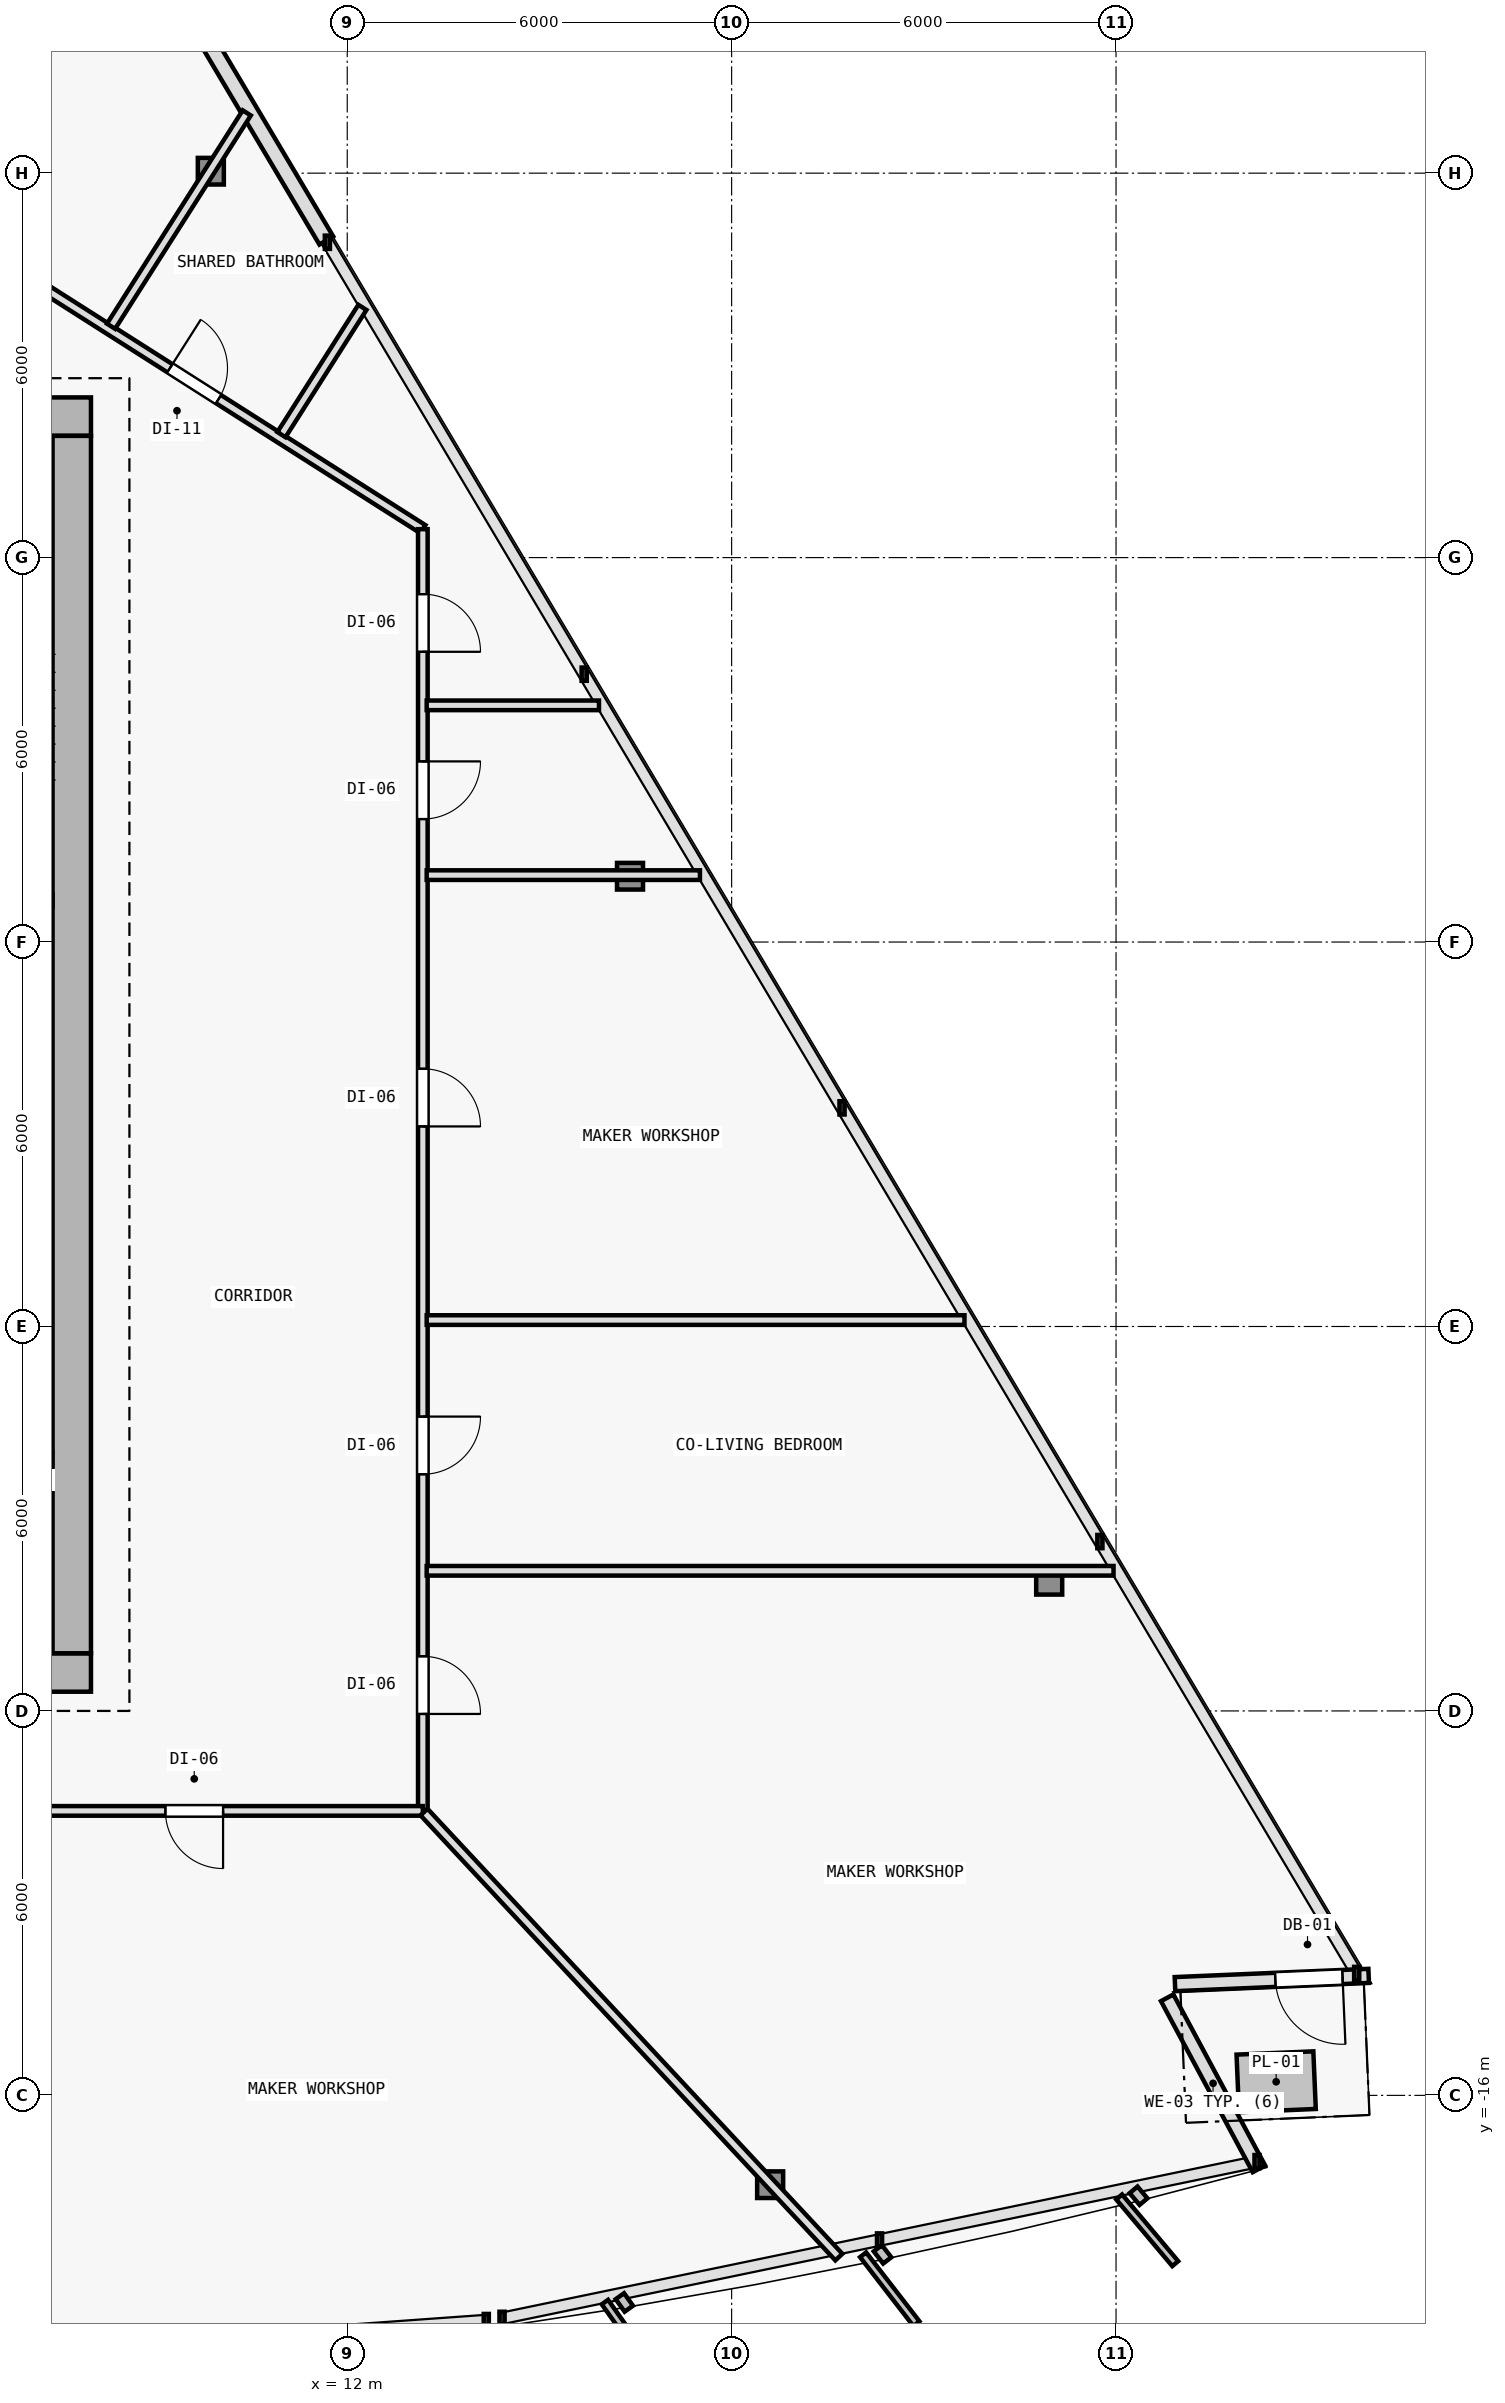
"""IFC4 building model, lengths in metres.
Left out: names, types, materials, properties, quantities, classifications, styles, units other than length and angle.
Written with IfcOpenShell. Run it as: python <this file> out.ifc"""

import sys

from ifc_helpers import new_model, si_unit, direction, frame, frame_2d, origin, origin_2d, place, context, subcontext, project, spatial, rectangle, i_section, extrude, element, fill, save


model = new_model("IFC4")
c1 = context("Model", 3, precision=1e-05, world=origin(), true_north=direction((0.0, 1.0)))
c2 = subcontext(c1, "Body", "Model", "MODEL_VIEW")
j1 = project(units=[si_unit("LENGTHUNIT", "METRE"), si_unit("PLANEANGLEUNIT", "RADIAN")], contexts=[c1])
p1 = place(None, origin())
s1 = spatial("IfcSite", under=j1, at=p1, CompositionType="ELEMENT")
p2 = place(p1, origin())
s2 = spatial("IfcBuilding", under=s1, at=p2, CompositionType="ELEMENT")
p3 = place(p2, frame((0.0, 0.0, 114.9)))
s3 = spatial("IfcBuildingStorey", under=s2, at=p3, CompositionType="ELEMENT", Elevation=114.9)
for number, where, z_axis, x_axis in (
    (1, (7.7, -9.4, 0.0), (0.0, 0.0, 1.0), (1.0, 0.0, 0.0)),
    (2, (7.7, 10.2, 0.0), (0.0, 0.0, 1.0), (1.0, 0.0, 0.0)),
    (3, (7.7, 0.4, 0.0), (0.0, 0.0, 1.0), (1.0, 0.0, 0.0)),
):
    element("IfcColumn", number, at=place(p3, frame(where, z_axis=z_axis, x_axis=x_axis)), inside=s3, PredefinedType="COLUMN", context=c2, shape_type="SweptSolid", body=[
        extrude(i_section(OverallWidth=0.409, OverallDepth=0.425, WebThickness=0.021, FlangeThickness=0.034, FilletRadius=0.015, at=origin_2d()), origin(), (0.0, 0.0, 1.0), 3.6),
    ])
p4 = place(p3, frame((18.601, -17.394, 0.006), z_axis=(-0.020596339702, 0.033443561496, 0.99922836178), x_axis=(-0.851480003019, -0.52438707503, 0.0)))
e4 = element("IfcColumn", 4, at=p4, inside=s3, PredefinedType="COLUMN", context=c2, shape_type="SweptSolid", body=[
    extrude(i_section(OverallWidth=0.406, OverallDepth=0.416, WebThickness=0.019, FlangeThickness=0.031, FilletRadius=0.015, at=origin_2d()), origin(), (0.0, 0.0, 1.0), 3.592),
])
p5 = place(p3, frame((22.957, -7.976, 0.006), z_axis=(-0.026107436898, 0.021620221181, 0.999425318758), x_axis=(-0.637813971185, -0.770190455771, 0.0)))
e5 = element("IfcColumn", 5, at=p5, inside=s3, PredefinedType="COLUMN", context=c2, shape_type="SweptSolid", body=[
    extrude(i_section(OverallWidth=0.406, OverallDepth=0.416, WebThickness=0.019, FlangeThickness=0.031, FilletRadius=0.015, at=origin_2d()), origin(), (0.0, 0.0, 1.0), 3.591),
])
p6 = place(p3, frame((16.414, 3.027, 0.006), z_axis=(-0.018907326549, 0.00952167524, 0.999775900241), x_axis=(-0.449781931574, -0.893138406984, 0.0)))
e6 = element("IfcColumn", 6, at=p6, inside=s3, PredefinedType="COLUMN", context=c2, shape_type="SweptSolid", body=[
    extrude(i_section(OverallWidth=0.406, OverallDepth=0.416, WebThickness=0.019, FlangeThickness=0.031, FilletRadius=0.015, at=origin_2d()), origin(), (0.0, 0.0, 1.0), 3.59),
])
p7 = place(p3, frame((9.871, 14.031, 0.006), z_axis=(-0.011699842352, -0.002516826552, 0.999928387072), x_axis=(0.210305364179, -0.977635746993, 0.0)))
e7 = element("IfcColumn", 7, at=p7, inside=s3, PredefinedType="COLUMN", context=c2, shape_type="SweptSolid", body=[
    extrude(i_section(OverallWidth=0.406, OverallDepth=0.416, WebThickness=0.019, FlangeThickness=0.031, FilletRadius=0.015, at=origin_2d()), origin(), (0.0, 0.0, 1.0), 3.589),
])
p8 = place(p3, frame((6.017, 22.462, 0.0), z_axis=(0.0, 0.0, 1.0), x_axis=(0.511085523564, -0.859529864288, 0.0)))
e8 = element("IfcWall", 8, at=p8, inside=s3, PredefinedType="SOLIDWALL", context=c2, shape_type="SweptSolid", body=[
    extrude(rectangle(XDim=11.068, YDim=0.25, at=frame_2d((5.534, 0.0))), origin(), (0.0, 0.0, 1.0), 3.35),
])
p9 = place(p8, frame((5.084, 0.0, 0.62)))
e9 = element("IfcOpeningElement", 9, at=p9, cuts=e8, PredefinedType="OPENING", context=c2, shape_type="SweptSolid", body=[
    extrude(rectangle(XDim=0.9, YDim=1.6, at=frame_2d((0.45, 0.8))), frame((0.0, 0.135, 0.0), z_axis=(0.0, -1.0, 0.0), x_axis=(1.0, 0.0, 0.0)), (0.0, 0.0, 1.0), 0.27),
])
p10 = place(p3, frame((24.798, -14.477, 0.0), z_axis=(0.0, 0.0, 1.0), x_axis=(0.472820757697, -0.881158629925, 0.0)))
e10 = element("IfcWall", 10, at=p10, inside=s3, PredefinedType="SOLIDWALL", context=c2, shape_type="SweptSolid", body=[
    extrude(rectangle(XDim=3.029, YDim=0.22, at=frame_2d((1.514, 0.0))), origin(), (0.0, 0.0, 1.0), 3.35),
])
p11 = place(p3, frame((27.943, -14.135, 0.0), z_axis=(0.0, 0.0, 1.0), x_axis=(-0.999095621918, -0.042519857284, 0.0)))
e11 = element("IfcWall", 11, at=p11, inside=s3, PredefinedType="SOLIDWALL", context=c2, shape_type="SweptSolid", body=[
    extrude(rectangle(XDim=3.026, YDim=0.22, at=frame_2d((1.513, 0.0))), origin(), (0.0, 0.0, 1.0), 3.35),
])
p12 = place(p11, frame((0.408, 0.0, 0.0)))
e12 = element("IfcOpeningElement", 12, at=p12, cuts=e11, PredefinedType="OPENING", context=c2, shape_type="SweptSolid", body=[
    extrude(rectangle(XDim=1.05, YDim=2.15, at=frame_2d((0.525, 1.075))), frame((0.0, 0.12, 0.0), z_axis=(0.0, -1.0, 0.0), x_axis=(1.0, 0.0, 0.0)), (0.0, 0.0, 1.0), 0.24),
])
p13 = place(p3, frame((-8.0, -9.4, 0.0), z_axis=(0.0, 0.0, 1.0), x_axis=(1.0, 0.0, 0.0)))
e13 = element("IfcWall", 13, at=p13, inside=s3, PredefinedType="SHEAR", context=c2, shape_type="SweptSolid", body=[
    extrude(rectangle(XDim=16.0, YDim=0.6, at=frame_2d((8.0, 0.0))), origin(), (0.0, 0.0, 1.0), 3.35),
])
p14 = place(p13, frame((9.65, 0.0, 0.0)))
e14 = element("IfcOpeningElement", 14, at=p14, cuts=e13, PredefinedType="OPENING", context=c2, shape_type="SweptSolid", body=[
    extrude(rectangle(XDim=1.5, YDim=2.2, at=frame_2d((0.75, 1.1))), frame((0.0, 0.31, 0.0), z_axis=(0.0, -1.0, 0.0), x_axis=(1.0, 0.0, 0.0)), (0.0, 0.0, 1.0), 0.62),
])
p15 = place(p3, frame((8.0, 10.2, 0.0), z_axis=(0.0, 0.0, 1.0), x_axis=(-1.0, 0.0, 0.0)))
e15 = element("IfcWall", 15, at=p15, inside=s3, PredefinedType="SHEAR", context=c2, shape_type="SweptSolid", body=[
    extrude(rectangle(XDim=16.0, YDim=0.6, at=frame_2d((8.0, 0.0))), origin(), (0.0, 0.0, 1.0), 3.35),
])
p16 = place(p15, frame((4.45, 0.0, 0.0)))
e16 = element("IfcOpeningElement", 16, at=p16, cuts=e15, PredefinedType="OPENING", context=c2, shape_type="SweptSolid", body=[
    extrude(rectangle(XDim=1.1, YDim=2.15, at=frame_2d((0.55, 1.075))), frame((0.0, 0.31, 0.0), z_axis=(0.0, -1.0, 0.0), x_axis=(1.0, 0.0, 0.0)), (0.0, 0.0, 1.0), 0.62),
])
p17 = place(p3, frame((7.7, 9.9, 0.0), z_axis=(0.0, 0.0, 1.0), x_axis=(0.0, -1.0, 0.0)))
e17 = element("IfcWall", 17, at=p17, inside=s3, PredefinedType="SHEAR", context=c2, shape_type="SweptSolid", body=[
    extrude(rectangle(XDim=19.0, YDim=0.6, at=frame_2d((9.5, 0.0))), origin(), (0.0, 0.0, 1.0), 3.35),
])
p18 = place(p3, frame((4.05, 2.65, 0.0), z_axis=(0.0, 0.0, 1.0), x_axis=(1.0, 0.0, 0.0)))
e18 = element("IfcWall", 18, at=p18, inside=s3, PredefinedType="SOLIDWALL", context=c2, shape_type="SweptSolid", body=[
    extrude(rectangle(XDim=3.35, YDim=0.2, at=frame_2d((1.675, 0.0))), origin(), (0.0, 0.0, 1.0), 3.35),
])
p19 = place(p3, frame((4.15, -6.05, 0.0), z_axis=(0.0, 0.0, 1.0), x_axis=(1.0, 0.0, 0.0)))
e19 = element("IfcWall", 19, at=p19, inside=s3, PredefinedType="SOLIDWALL", context=c2, shape_type="SweptSolid", body=[
    extrude(rectangle(XDim=3.245, YDim=0.2, at=frame_2d((1.623, 0.0))), origin(), (0.0, 0.0, 1.0), 3.35),
])
p20 = place(p3, frame((7.023, 12.36, 0.0), z_axis=(0.0, 0.0, 1.0), x_axis=(0.84376480085, -0.536713108511, 0.0)))
e20 = element("IfcWall", 20, at=p20, inside=s3, PredefinedType="PARTITIONING", context=c2, shape_type="SweptSolid", body=[
    extrude(rectangle(XDim=7.297, YDim=0.15, at=frame_2d((3.648, 0.0))), origin(), (0.0, 0.0, 1.0), 2.775),
])
p21 = place(p20, frame((2.617, 0.0, 0.0)))
e21 = element("IfcOpeningElement", 21, at=p21, cuts=e20, PredefinedType="OPENING", context=c2, shape_type="SweptSolid", body=[
    extrude(rectangle(XDim=0.9, YDim=2.1, at=frame_2d((0.45, 1.05))), frame((0.0, 0.085, 0.0), z_axis=(0.0, -1.0, 0.0), x_axis=(1.0, 0.0, 0.0)), (0.0, 0.0, 1.0), 0.17),
])
p22 = place(p3, frame((13.18, 8.444, 0.0), z_axis=(0.0, 0.0, 1.0), x_axis=(0.0, -1.0, 0.0)))
e22 = element("IfcWall", 22, at=p22, inside=s3, PredefinedType="PARTITIONING", context=c2, shape_type="SweptSolid", body=[
    extrude(rectangle(XDim=20.004, YDim=0.15, at=frame_2d((10.002, 0.0))), origin(), (0.0, 0.0, 1.0), 2.705),
])
p23 = place(p22, frame((17.591, 0.0, 0.0)))
e23 = element("IfcOpeningElement", 23, at=p23, cuts=e22, PredefinedType="OPENING", context=c2, shape_type="SweptSolid", body=[
    extrude(rectangle(XDim=0.9, YDim=2.1, at=frame_2d((0.45, 1.05))), frame((0.0, 0.085, 0.0), z_axis=(0.0, -1.0, 0.0), x_axis=(1.0, 0.0, 0.0)), (0.0, 0.0, 1.0), 0.17),
])
p24 = place(p22, frame((13.85, 0.0, 0.0)))
e24 = element("IfcOpeningElement", 24, at=p24, cuts=e22, PredefinedType="OPENING", context=c2, shape_type="SweptSolid", body=[
    extrude(rectangle(XDim=0.9, YDim=2.1, at=frame_2d((0.45, 1.05))), frame((0.0, 0.085, 0.0), z_axis=(0.0, -1.0, 0.0), x_axis=(1.0, 0.0, 0.0)), (0.0, 0.0, 1.0), 0.17),
])
p25 = place(p22, frame((8.422, 0.0, 0.0)))
e25 = element("IfcOpeningElement", 25, at=p25, cuts=e22, PredefinedType="OPENING", context=c2, shape_type="SweptSolid", body=[
    extrude(rectangle(XDim=0.9, YDim=2.1, at=frame_2d((0.45, 1.05))), frame((0.0, 0.085, 0.0), z_axis=(0.0, -1.0, 0.0), x_axis=(1.0, 0.0, 0.0)), (0.0, 0.0, 1.0), 0.17),
])
p26 = place(p22, frame((3.625, 0.0, 0.0)))
e26 = element("IfcOpeningElement", 26, at=p26, cuts=e22, PredefinedType="OPENING", context=c2, shape_type="SweptSolid", body=[
    extrude(rectangle(XDim=0.9, YDim=2.1, at=frame_2d((0.45, 1.05))), frame((0.0, 0.085, 0.0), z_axis=(0.0, -1.0, 0.0), x_axis=(1.0, 0.0, 0.0)), (0.0, 0.0, 1.0), 0.17),
])
p27 = place(p22, frame((1.014, 0.0, 0.0)))
e27 = element("IfcOpeningElement", 27, at=p27, cuts=e22, PredefinedType="OPENING", context=c2, shape_type="SweptSolid", body=[
    extrude(rectangle(XDim=0.9, YDim=2.1, at=frame_2d((0.45, 1.05))), frame((0.0, 0.085, 0.0), z_axis=(0.0, -1.0, 0.0), x_axis=(1.0, 0.0, 0.0)), (0.0, 0.0, 1.0), 0.17),
])
p28 = place(p3, frame((13.18, -11.56, 0.0), z_axis=(0.0, 0.0, 1.0), x_axis=(-1.0, 0.0, 0.0)))
e28 = element("IfcWall", 28, at=p28, inside=s3, PredefinedType="PARTITIONING", context=c2, shape_type="SweptSolid", body=[
    extrude(rectangle(XDim=23.04, YDim=0.15, at=frame_2d((11.52, 0.0))), origin(), (0.0, 0.0, 1.0), 2.775),
])
p29 = place(p28, frame((20.682, 0.0, 0.0)))
e29 = element("IfcOpeningElement", 29, at=p29, cuts=e28, PredefinedType="OPENING", context=c2, shape_type="SweptSolid", body=[
    extrude(rectangle(XDim=0.9, YDim=2.1, at=frame_2d((0.45, 1.05))), frame((0.0, 0.085, 0.0), z_axis=(0.0, -1.0, 0.0), x_axis=(1.0, 0.0, 0.0)), (0.0, 0.0, 1.0), 0.17),
])
p30 = place(p28, frame((12.73, 0.0, 0.0)))
e30 = element("IfcOpeningElement", 30, at=p30, cuts=e28, PredefinedType="OPENING", context=c2, shape_type="SweptSolid", body=[
    extrude(rectangle(XDim=0.9, YDim=2.1, at=frame_2d((0.45, 1.05))), frame((0.0, 0.085, 0.0), z_axis=(0.0, -1.0, 0.0), x_axis=(1.0, 0.0, 0.0)), (0.0, 0.0, 1.0), 0.17),
])
p31 = place(p28, frame((3.118, 0.0, 0.0)))
e31 = element("IfcOpeningElement", 31, at=p31, cuts=e28, PredefinedType="OPENING", context=c2, shape_type="SweptSolid", body=[
    extrude(rectangle(XDim=0.9, YDim=2.1, at=frame_2d((0.45, 1.05))), frame((0.0, 0.085, 0.0), z_axis=(0.0, -1.0, 0.0), x_axis=(1.0, 0.0, 0.0)), (0.0, 0.0, 1.0), 0.17),
])
p32 = place(p3, frame((13.199, -11.579, 0.0), z_axis=(0.0, 0.0, 1.0), x_axis=(0.68192513302, -0.731421980087, 0.0)))
e32 = element("IfcWall", 32, at=p32, inside=s3, PredefinedType="PARTITIONING", context=c2, shape_type="SweptSolid", body=[
    extrude(rectangle(XDim=9.495, YDim=0.15, at=frame_2d((4.748, 0.0))), origin(), (0.0, 0.0, 1.0), 2.775),
])
p33 = place(p3, frame((13.24, 3.044, 0.0), z_axis=(0.0, 0.0, 1.0), x_axis=(1.0, 0.0, 0.0)))
e33 = element("IfcWall", 33, at=p33, inside=s3, PredefinedType="PARTITIONING", context=c2, shape_type="SweptSolid", body=[
    extrude(rectangle(XDim=4.265, YDim=0.15, at=frame_2d((2.133, 0.0))), origin(), (0.0, 0.0, 1.0), 2.885),
])
p34 = place(p3, frame((8.313, 11.611, 0.0), z_axis=(0.0, 0.0, 1.0), x_axis=(0.536683331262, 0.843783741219, 0.0)))
e34 = element("IfcWall", 34, at=p34, inside=s3, PredefinedType="PARTITIONING", context=c2, shape_type="SweptSolid", body=[
    extrude(rectangle(XDim=3.946, YDim=0.15, at=frame_2d((1.973, 0.0))), origin(), (0.0, 0.0, 1.0), 2.775),
])
p35 = place(p3, frame((10.973, 9.919, 0.0), z_axis=(0.0, 0.0, 1.0), x_axis=(0.536694294015, 0.843776768329, 0.0)))
e35 = element("IfcWall", 35, at=p35, inside=s3, PredefinedType="PARTITIONING", context=c2, shape_type="SweptSolid", body=[
    extrude(rectangle(XDim=2.354, YDim=0.15, at=frame_2d((1.177, 0.0))), origin(), (0.0, 0.0, 1.0), 2.885),
])
p36 = place(p3, frame((13.24, -3.9, 0.0), z_axis=(0.0, 0.0, 1.0), x_axis=(1.0, 0.0, 0.0)))
e36 = element("IfcWall", 36, at=p36, inside=s3, PredefinedType="PARTITIONING", context=c2, shape_type="SweptSolid", body=[
    extrude(rectangle(XDim=8.394, YDim=0.15, at=frame_2d((4.197, 0.0))), origin(), (0.0, 0.0, 1.0), 2.725),
])
p37 = place(p3, frame((13.24, 5.694, 0.0), z_axis=(0.0, 0.0, 1.0), x_axis=(1.0, 0.0, 0.0)))
e37 = element("IfcWall", 37, at=p37, inside=s3, PredefinedType="PARTITIONING", context=c2, shape_type="SweptSolid", body=[
    extrude(rectangle(XDim=2.689, YDim=0.15, at=frame_2d((1.345, 0.0))), origin(), (0.0, 0.0, 1.0), 2.885),
])
p38 = place(p3, frame((13.24, -7.813, 0.0), z_axis=(0.0, 0.0, 1.0), x_axis=(1.0, 0.0, 0.0)))
e38 = element("IfcWall", 38, at=p38, inside=s3, PredefinedType="PARTITIONING", context=c2, shape_type="SweptSolid", body=[
    extrude(rectangle(XDim=10.721, YDim=0.15, at=frame_2d((5.36, 0.0))), origin(), (0.0, 0.0, 1.0), 2.705),
])
p39 = place(p12, origin())
e39 = element("IfcDoor", 39, at=p39, inside=s3, OperationType="SINGLE_SWING_LEFT", PredefinedType="DOOR", context=c2, shape_type="SweptSolid", body=[
    extrude(rectangle(XDim=1.05, YDim=2.15, at=frame_2d((0.525, 1.075))), frame((0.0, 0.025, 0.0), z_axis=(0.0, -1.0, 0.0), x_axis=(1.0, 0.0, 0.0)), (0.0, 0.0, 1.0), 0.05),
])
fill(e12, e39)
p40 = place(p31, origin())
e40 = element("IfcDoor", 40, at=p40, inside=s3, OperationType="SINGLE_SWING_LEFT", PredefinedType="DOOR", context=c2, shape_type="SweptSolid", body=[
    extrude(rectangle(XDim=0.9, YDim=2.1, at=frame_2d((0.45, 1.05))), frame((0.0, 0.025, 0.0), z_axis=(0.0, -1.0, 0.0), x_axis=(1.0, 0.0, 0.0)), (0.0, 0.0, 1.0), 0.05),
])
fill(e31, e40)
p41 = place(p23, origin())
e41 = element("IfcDoor", 41, at=p41, inside=s3, OperationType="SINGLE_SWING_RIGHT", PredefinedType="DOOR", context=c2, shape_type="SweptSolid", body=[
    extrude(rectangle(XDim=0.9, YDim=2.1, at=frame_2d((0.45, 1.05))), frame((0.0, 0.025, 0.0), z_axis=(0.0, -1.0, 0.0), x_axis=(1.0, 0.0, 0.0)), (0.0, 0.0, 1.0), 0.05),
])
fill(e23, e41)
p42 = place(p24, origin())
e42 = element("IfcDoor", 42, at=p42, inside=s3, OperationType="SINGLE_SWING_LEFT", PredefinedType="DOOR", context=c2, shape_type="SweptSolid", body=[
    extrude(rectangle(XDim=0.9, YDim=2.1, at=frame_2d((0.45, 1.05))), frame((0.0, 0.025, 0.0), z_axis=(0.0, -1.0, 0.0), x_axis=(1.0, 0.0, 0.0)), (0.0, 0.0, 1.0), 0.05),
])
fill(e24, e42)
p43 = place(p25, origin())
e43 = element("IfcDoor", 43, at=p43, inside=s3, OperationType="SINGLE_SWING_RIGHT", PredefinedType="DOOR", context=c2, shape_type="SweptSolid", body=[
    extrude(rectangle(XDim=0.9, YDim=2.1, at=frame_2d((0.45, 1.05))), frame((0.0, 0.025, 0.0), z_axis=(0.0, -1.0, 0.0), x_axis=(1.0, 0.0, 0.0)), (0.0, 0.0, 1.0), 0.05),
])
fill(e25, e43)
p44 = place(p26, origin())
e44 = element("IfcDoor", 44, at=p44, inside=s3, OperationType="SINGLE_SWING_LEFT", PredefinedType="DOOR", context=c2, shape_type="SweptSolid", body=[
    extrude(rectangle(XDim=0.9, YDim=2.1, at=frame_2d((0.45, 1.05))), frame((0.0, 0.025, 0.0), z_axis=(0.0, -1.0, 0.0), x_axis=(1.0, 0.0, 0.0)), (0.0, 0.0, 1.0), 0.05),
])
fill(e26, e44)
p45 = place(p27, origin())
e45 = element("IfcDoor", 45, at=p45, inside=s3, OperationType="SINGLE_SWING_RIGHT", PredefinedType="DOOR", context=c2, shape_type="SweptSolid", body=[
    extrude(rectangle(XDim=0.9, YDim=2.1, at=frame_2d((0.45, 1.05))), frame((0.0, 0.025, 0.0), z_axis=(0.0, -1.0, 0.0), x_axis=(1.0, 0.0, 0.0)), (0.0, 0.0, 1.0), 0.05),
])
fill(e27, e45)
p46 = place(p21, origin())
e46 = element("IfcDoor", 46, at=p46, inside=s3, OperationType="SINGLE_SWING_LEFT", PredefinedType="DOOR", context=c2, shape_type="SweptSolid", body=[
    extrude(rectangle(XDim=0.9, YDim=2.1, at=frame_2d((0.45, 1.05))), frame((0.0, 0.025, 0.0), z_axis=(0.0, -1.0, 0.0), x_axis=(1.0, 0.0, 0.0)), (0.0, 0.0, 1.0), 0.05),
])
fill(e21, e46)
save(model, sys.argv[1])
